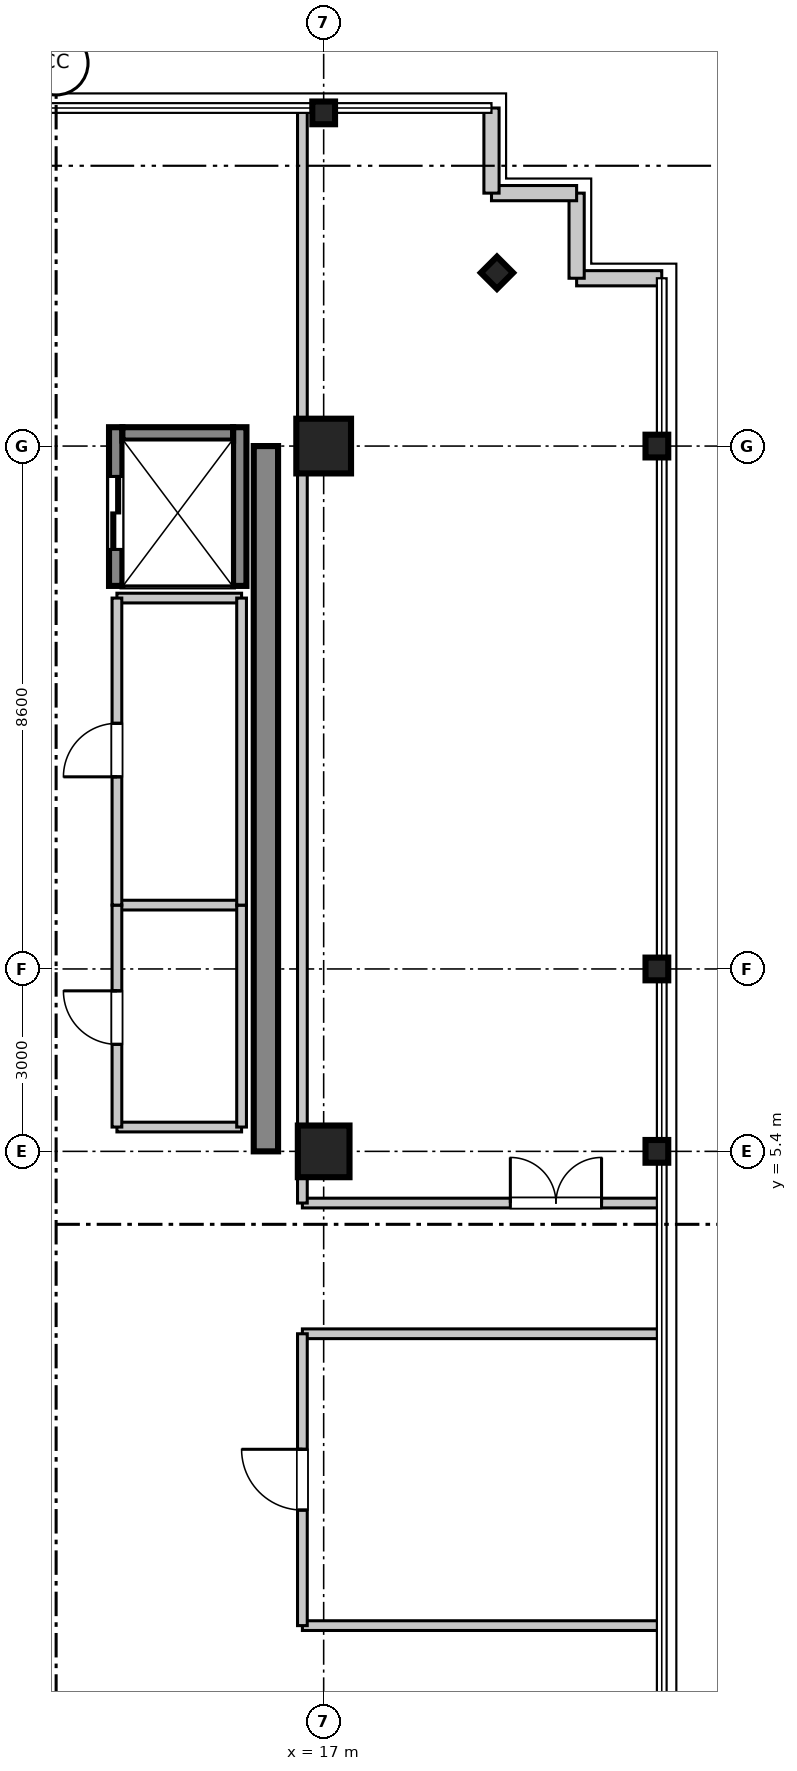
"""IFC4 building model, lengths in metres.
Left out: names, types, materials, properties, quantities, classifications, styles, units other than length and angle.
Written with IfcOpenShell. Run it as: python <this file> out.ifc"""

import sys

from ifc_helpers import new_model, si_unit, direction, frame, frame_2d, origin, origin_2d, place, context, subcontext, project, spatial, rectangle, i_section, extrude, source, transform, mapped, element, fill, save


model = new_model("IFC4")
c1 = context("Model", 3, precision=1e-05, world=origin(), true_north=direction((0.0, 1.0)))
c2 = subcontext(c1, "Body", "Model", "MODEL_VIEW")
j1 = project(units=[si_unit("LENGTHUNIT", "METRE"), si_unit("PLANEANGLEUNIT", "RADIAN")], contexts=[c1])
p1 = place(None, origin())
s1 = spatial("IfcSite", under=j1, at=p1, CompositionType="ELEMENT")
p2 = place(p1, origin())
s2 = spatial("IfcBuilding", under=s1, at=p2, CompositionType="ELEMENT")
p3 = place(p2, frame((0.0, 0.0, 352.05)))
s3 = spatial("IfcBuildingStorey", under=s2, at=p3, CompositionType="ELEMENT", Elevation=352.05)
m1 = source(origin(), c2, "Body", "SweptSolid", [
    extrude(rectangle(XDim=0.85, YDim=0.85, at=origin_2d()), origin(), (0.0, 0.0, 1.0), 4.955),
])
p4 = place(p3, frame((17.0, 5.4, 0.0), z_axis=(0.0, 0.0, 1.0), x_axis=(1.0, 0.0, 0.0)))
e1 = element("IfcColumn", 1, at=p4, inside=s3, PredefinedType="PILASTER", context=c2, shape_type="MappedRepresentation", body=[
    mapped(m1, transform((0.0, 0.0, 0.0), scale=1.0)),
])
m2 = source(origin(), c2, "Body", "SweptSolid", [
    extrude(rectangle(XDim=0.9, YDim=0.9, at=origin_2d()), origin(), (0.0, 0.0, 1.0), 4.955),
])
p5 = place(p3, frame((17.0, 17.0, 0.0), z_axis=(0.0, 0.0, 1.0), x_axis=(1.0, 0.0, 0.0)))
e2 = element("IfcColumn", 2, at=p5, inside=s3, PredefinedType="COLUMN", context=c2, shape_type="MappedRepresentation", body=[
    mapped(m2, transform((0.0, 0.0, 0.0), scale=1.0)),
])
m3 = source(origin(), c2, "Body", "SweptSolid", [
    extrude(i_section(OverallWidth=0.374, OverallDepth=0.374, WebThickness=0.014, FlangeThickness=0.023, at=origin_2d()), origin(), (0.0, 0.0, 1.0), 4.955),
])
for number, where, z_axis, x_axis in (
    (3, (22.48, 5.4, 0.0), (0.0, 0.0, 1.0), (1.0, 0.0, 0.0)),
    (4, (22.48, 8.4, 0.0), (0.0, 0.0, 1.0), (1.0, 0.0, 0.0)),
    (5, (22.48, 17.0, 0.0), (0.0, 0.0, 1.0), (1.0, 0.0, 0.0)),
    (6, (17.0, 22.48, 0.0), (0.0, 0.0, 1.0), (0.0, 1.0, 0.0)),
    (7, (19.85, 19.85, 0.0), (0.0, 0.0, 1.0), (0.707, 0.707, 0.0)),
):
    element("IfcColumn", number, at=place(p3, frame(where, z_axis=z_axis, x_axis=x_axis)), inside=s3, PredefinedType="COLUMN", context=c2, shape_type="MappedRepresentation", body=[
        mapped(m3, transform((0.0, 0.0, 0.0), scale=1.0)),
    ])
m4 = source(origin(), c2, "Body", "SweptSolid", [
    extrude(rectangle(XDim=11.6, YDim=0.4, at=frame_2d((5.8, 0.0))), origin(), (0.0, 0.0, 1.0), 4.7),
])
p6 = place(p3, frame((16.05, 5.4, 0.0), z_axis=(0.0, 0.0, 1.0), x_axis=(0.0, 1.0, 0.0)))
e8 = element("IfcWall", 8, at=p6, inside=s3, PredefinedType="SHEAR", context=c2, shape_type="MappedRepresentation", body=[
    mapped(m4, transform((0.0, 0.0, 0.0), scale=1.0)),
])
m5 = source(origin(), c2, "Body", "SweptSolid", [
    extrude(rectangle(XDim=2.61, YDim=0.22, at=frame_2d((1.305, 0.0))), origin(), (0.0, 0.0, 1.0), 4.7),
])
p7 = place(p3, frame((13.58, 14.7, 0.0), z_axis=(0.0, 0.0, 1.0), x_axis=(0.0, 1.0, 0.0)))
e9 = element("IfcWall", 9, at=p7, inside=s3, PredefinedType="SHEAR", context=c2, shape_type="MappedRepresentation", body=[
    mapped(m5, transform((0.0, 0.0, 0.0), scale=1.0)),
])
p8 = place(p7, frame((0.6, 0.0, 0.0)))
e10 = element("IfcOpeningElement", 10, at=p8, cuts=e9, PredefinedType="OPENING", context=c2, shape_type="SweptSolid", body=[
    extrude(rectangle(XDim=1.2, YDim=2.2, at=frame_2d((0.6, 1.1))), frame((0.0, 0.12, 0.0), z_axis=(0.0, -1.0, 0.0), x_axis=(1.0, 0.0, 0.0)), (0.0, 0.0, 1.0), 0.24),
])
p9 = place(p3, frame((15.62, 14.7, 0.0), z_axis=(0.0, 0.0, 1.0), x_axis=(0.0, 1.0, 0.0)))
e11 = element("IfcWall", 11, at=p9, inside=s3, PredefinedType="SHEAR", context=c2, shape_type="MappedRepresentation", body=[
    mapped(m5, transform((0.0, 0.0, 0.0), scale=1.0)),
])
m6 = source(origin(), c2, "Body", "SweptSolid", [
    extrude(rectangle(XDim=1.82, YDim=0.22, at=frame_2d((0.91, 0.0))), origin(), (0.0, 0.0, 1.0), 4.7),
])
p10 = place(p3, frame((13.69, 17.2, 0.0), z_axis=(0.0, 0.0, 1.0), x_axis=(1.0, 0.0, 0.0)))
e12 = element("IfcWall", 12, at=p10, inside=s3, PredefinedType="SHEAR", context=c2, shape_type="MappedRepresentation", body=[
    mapped(m6, transform((0.0, 0.0, 0.0), scale=1.0)),
])
m7 = source(origin(), c2, "Body", "SweptSolid", [
    extrude(rectangle(XDim=1.4, YDim=0.25, at=frame_2d((0.7, 0.0))), origin(), (0.0, 0.0, 1.0), 4.7),
])
p11 = place(p3, frame((21.16, 19.76, 0.0), z_axis=(0.0, 0.0, 1.0), x_axis=(1.0, 0.0, 0.0)))
e13 = element("IfcWall", 13, at=p11, inside=s3, PredefinedType="STANDARD", context=c2, shape_type="MappedRepresentation", body=[
    mapped(m7, transform((0.0, 0.0, 0.0), scale=1.0)),
])
m8 = source(origin(), c2, "Body", "SweptSolid", [
    extrude(rectangle(XDim=1.4, YDim=0.25, at=frame_2d((0.7, 0.0))), origin(), (0.0, 0.0, 1.0), 4.7),
])
for number, where, z_axis, x_axis in (
    (14, (21.16, 19.76, 0.0), (0.0, 0.0, 1.0), (0.0, 1.0, 0.0)),
    (15, (19.76, 21.16, 0.0), (0.0, 0.0, 1.0), (1.0, 0.0, 0.0)),
):
    element("IfcWall", number, at=place(p3, frame(where, z_axis=z_axis, x_axis=x_axis)), inside=s3, PredefinedType="STANDARD", context=c2, shape_type="MappedRepresentation", body=[
        mapped(m8, transform((0.0, 0.0, 0.0), scale=1.0)),
    ])
p12 = place(p3, frame((19.76, 21.16, 0.0), z_axis=(0.0, 0.0, 1.0), x_axis=(0.0, 1.0, 0.0)))
e16 = element("IfcWall", 16, at=p12, inside=s3, PredefinedType="STANDARD", context=c2, shape_type="MappedRepresentation", body=[
    mapped(m7, transform((0.0, 0.0, 0.0), scale=1.0)),
])
m9 = source(origin(), c2, "Body", "SweptSolid", [
    extrude(rectangle(XDim=2.05, YDim=0.16, at=frame_2d((1.025, 0.0))), origin(), (0.0, 0.0, 1.0), 3.4),
])
for number, where, z_axis, x_axis in (
    (17, (13.6, 5.8, 0.0), (0.0, 0.0, 1.0), (1.0, 0.0, 0.0)),
    (18, (13.6, 9.45, 0.0), (0.0, 0.0, 1.0), (1.0, 0.0, 0.0)),
):
    element("IfcWall", number, at=place(p3, frame(where, z_axis=z_axis, x_axis=x_axis)), inside=s3, PredefinedType="PARTITIONING", context=c2, shape_type="MappedRepresentation", body=[
        mapped(m9, transform((0.0, 0.0, 0.0), scale=1.0)),
    ])
m10 = source(origin(), c2, "Body", "SweptSolid", [
    extrude(rectangle(XDim=3.65, YDim=0.16, at=frame_2d((1.825, 0.0))), origin(), (0.0, 0.0, 1.0), 3.4),
])
p13 = place(p3, frame((13.6, 5.8, 0.0), z_axis=(0.0, 0.0, 1.0), x_axis=(0.0, 1.0, 0.0)))
e19 = element("IfcWall", 19, at=p13, inside=s3, PredefinedType="PARTITIONING", context=c2, shape_type="MappedRepresentation", body=[
    mapped(m10, transform((0.0, 0.0, 0.0), scale=1.0)),
])
p14 = place(p13, frame((1.36, 0.0, 0.0)))
e20 = element("IfcOpeningElement", 20, at=p14, cuts=e19, PredefinedType="OPENING", context=c2, shape_type="SweptSolid", body=[
    extrude(rectangle(XDim=0.88, YDim=2.1, at=frame_2d((0.44, 1.05))), frame((0.0, 0.09, 0.0), z_axis=(0.0, -1.0, 0.0), x_axis=(1.0, 0.0, 0.0)), (0.0, 0.0, 1.0), 0.18),
])
p15 = place(p3, frame((15.65, 5.8, 0.0), z_axis=(0.0, 0.0, 1.0), x_axis=(0.0, 1.0, 0.0)))
e21 = element("IfcWall", 21, at=p15, inside=s3, PredefinedType="PARTITIONING", context=c2, shape_type="MappedRepresentation", body=[
    mapped(m10, transform((0.0, 0.0, 0.0), scale=1.0)),
])
p16 = place(p3, frame((13.6, 14.5, 0.0), z_axis=(0.0, 0.0, 1.0), x_axis=(1.0, 0.0, 0.0)))
e22 = element("IfcWall", 22, at=p16, inside=s3, PredefinedType="PARTITIONING", context=c2, shape_type="MappedRepresentation", body=[
    mapped(m9, transform((0.0, 0.0, 0.0), scale=1.0)),
])
m11 = source(origin(), c2, "Body", "SweptSolid", [
    extrude(rectangle(XDim=5.05, YDim=0.16, at=frame_2d((2.525, 0.0))), origin(), (0.0, 0.0, 1.0), 3.4),
])
p17 = place(p3, frame((13.6, 9.45, 0.0), z_axis=(0.0, 0.0, 1.0), x_axis=(0.0, 1.0, 0.0)))
e23 = element("IfcWall", 23, at=p17, inside=s3, PredefinedType="PARTITIONING", context=c2, shape_type="MappedRepresentation", body=[
    mapped(m11, transform((0.0, 0.0, 0.0), scale=1.0)),
])
p18 = place(p17, frame((2.11, 0.0, 0.0)))
e24 = element("IfcOpeningElement", 24, at=p18, cuts=e23, PredefinedType="OPENING", context=c2, shape_type="SweptSolid", body=[
    extrude(rectangle(XDim=0.88, YDim=2.1, at=frame_2d((0.44, 1.05))), frame((0.0, 0.09, 0.0), z_axis=(0.0, -1.0, 0.0), x_axis=(1.0, 0.0, 0.0)), (0.0, 0.0, 1.0), 0.18),
])
p19 = place(p3, frame((15.65, 9.45, 0.0), z_axis=(0.0, 0.0, 1.0), x_axis=(0.0, 1.0, 0.0)))
e25 = element("IfcWall", 25, at=p19, inside=s3, PredefinedType="PARTITIONING", context=c2, shape_type="MappedRepresentation", body=[
    mapped(m11, transform((0.0, 0.0, 0.0), scale=1.0)),
])
m12 = source(origin(), c2, "Body", "SweptSolid", [
    extrude(rectangle(XDim=5.85, YDim=0.16, at=frame_2d((2.925, 0.0))), origin(), (0.0, 0.0, 1.0), 3.4),
])
for number, where, z_axis, x_axis in (
    (26, (16.65, -2.4, 0.0), (0.0, 0.0, 1.0), (1.0, 0.0, 0.0)),
    (27, (16.65, 2.4, 0.0), (0.0, 0.0, 1.0), (1.0, 0.0, 0.0)),
):
    element("IfcWall", number, at=place(p3, frame(where, z_axis=z_axis, x_axis=x_axis)), inside=s3, PredefinedType="PARTITIONING", context=c2, shape_type="MappedRepresentation", body=[
        mapped(m12, transform((0.0, 0.0, 0.0), scale=1.0)),
    ])
m13 = source(origin(), c2, "Body", "SweptSolid", [
    extrude(rectangle(XDim=4.8, YDim=0.16, at=frame_2d((2.4, 0.0))), origin(), (0.0, 0.0, 1.0), 3.4),
])
p20 = place(p3, frame((16.65, -2.4, 0.0), z_axis=(0.0, 0.0, 1.0), x_axis=(0.0, 1.0, 0.0)))
e28 = element("IfcWall", 28, at=p20, inside=s3, PredefinedType="PARTITIONING", context=c2, shape_type="MappedRepresentation", body=[
    mapped(m13, transform((0.0, 0.0, 0.0), scale=1.0)),
])
p21 = place(p20, frame((1.9, 0.0, 0.0)))
e29 = element("IfcOpeningElement", 29, at=p21, cuts=e28, PredefinedType="OPENING", context=c2, shape_type="SweptSolid", body=[
    extrude(rectangle(XDim=1.0, YDim=2.1, at=frame_2d((0.5, 1.05))), frame((0.0, 0.09, 0.0), z_axis=(0.0, -1.0, 0.0), x_axis=(1.0, 0.0, 0.0)), (0.0, 0.0, 1.0), 0.18),
])
p22 = place(p3, frame((16.65, 4.55, 0.0), z_axis=(0.0, 0.0, 1.0), x_axis=(1.0, 0.0, 0.0)))
e30 = element("IfcWall", 30, at=p22, inside=s3, PredefinedType="PARTITIONING", context=c2, shape_type="MappedRepresentation", body=[
    mapped(m12, transform((0.0, 0.0, 0.0), scale=1.0)),
])
p23 = place(p22, frame((3.42, 0.0, 0.0)))
e31 = element("IfcOpeningElement", 31, at=p23, cuts=e30, PredefinedType="OPENING", context=c2, shape_type="SweptSolid", body=[
    extrude(rectangle(XDim=1.5, YDim=2.15, at=frame_2d((0.75, 1.075))), frame((0.0, 0.09, 0.0), z_axis=(0.0, -1.0, 0.0), x_axis=(1.0, 0.0, 0.0)), (0.0, 0.0, 1.0), 0.18),
])
m14 = source(origin(), c2, "Body", "SweptSolid", [
    extrude(rectangle(XDim=17.95, YDim=0.16, at=frame_2d((8.975, 0.0))), origin(), (0.0, 0.0, 1.0), 3.4),
])
p24 = place(p3, frame((16.65, 4.55, 0.0), z_axis=(0.0, 0.0, 1.0), x_axis=(0.0, 1.0, 0.0)))
e32 = element("IfcWall", 32, at=p24, inside=s3, PredefinedType="PARTITIONING", context=c2, shape_type="MappedRepresentation", body=[
    mapped(m14, transform((0.0, 0.0, 0.0), scale=1.0)),
])
m15 = source(origin(), c2, "Body", "SweptSolid", [
    extrude(rectangle(XDim=1.2, YDim=2.2, at=frame_2d((0.6, 1.1))), frame((0.0, 0.025, 0.0), z_axis=(0.0, -1.0, 0.0), x_axis=(1.0, 0.0, 0.0)), (0.0, 0.0, 1.0), 0.05),
])
p25 = place(p8, origin())
e33 = element("IfcDoor", 33, at=p25, inside=s3, OperationType="DOUBLE_DOOR_SLIDING", PredefinedType="DOOR", context=c2, shape_type="MappedRepresentation", body=[
    mapped(m15, transform((0.0, 0.0, 0.0), scale=1.0)),
])
fill(e10, e33)
m16 = source(origin(), c2, "Body", "SweptSolid", [
    extrude(rectangle(XDim=0.88, YDim=2.1, at=frame_2d((0.44, 1.05))), frame((0.0, 0.025, 0.0), z_axis=(0.0, -1.0, 0.0), x_axis=(1.0, 0.0, 0.0)), (0.0, 0.0, 1.0), 0.05),
])
p26 = place(p14, frame((0.88, 0.0, 0.0), z_axis=(0.0, 0.0, 1.0), x_axis=(-1.0, 0.0, 0.0)))
e34 = element("IfcDoor", 34, at=p26, inside=s3, OperationType="SINGLE_SWING_RIGHT", PredefinedType="DOOR", context=c2, shape_type="MappedRepresentation", body=[
    mapped(m16, transform((0.0, 0.0, 0.0), scale=1.0)),
])
fill(e20, e34)
p27 = place(p18, frame((0.88, 0.0, 0.0), z_axis=(0.0, 0.0, 1.0), x_axis=(-1.0, 0.0, 0.0)))
e35 = element("IfcDoor", 35, at=p27, inside=s3, OperationType="SINGLE_SWING_LEFT", PredefinedType="DOOR", context=c2, shape_type="MappedRepresentation", body=[
    mapped(m16, transform((0.0, 0.0, 0.0), scale=1.0)),
])
fill(e24, e35)
m17 = source(origin(), c2, "Body", "SweptSolid", [
    extrude(rectangle(XDim=1.0, YDim=2.1, at=frame_2d((0.5, 1.05))), frame((0.0, 0.025, 0.0), z_axis=(0.0, -1.0, 0.0), x_axis=(1.0, 0.0, 0.0)), (0.0, 0.0, 1.0), 0.05),
])
p28 = place(p21, frame((1.0, 0.0, 0.0), z_axis=(0.0, 0.0, 1.0), x_axis=(-1.0, 0.0, 0.0)))
e36 = element("IfcDoor", 36, at=p28, inside=s3, OperationType="SINGLE_SWING_RIGHT", PredefinedType="DOOR", context=c2, shape_type="MappedRepresentation", body=[
    mapped(m17, transform((0.0, 0.0, 0.0), scale=1.0)),
])
fill(e29, e36)
m18 = source(origin(), c2, "Body", "SweptSolid", [
    extrude(rectangle(XDim=1.5, YDim=2.15, at=frame_2d((0.75, 1.075))), frame((0.0, 0.025, 0.0), z_axis=(0.0, -1.0, 0.0), x_axis=(1.0, 0.0, 0.0)), (0.0, 0.0, 1.0), 0.05),
])
p29 = place(p23, origin())
e37 = element("IfcDoor", 37, at=p29, inside=s3, OperationType="DOUBLE_DOOR_SINGLE_SWING", PredefinedType="DOOR", context=c2, shape_type="MappedRepresentation", body=[
    mapped(m18, transform((0.0, 0.0, 0.0), scale=1.0)),
])
fill(e31, e37)
save(model, sys.argv[1])
